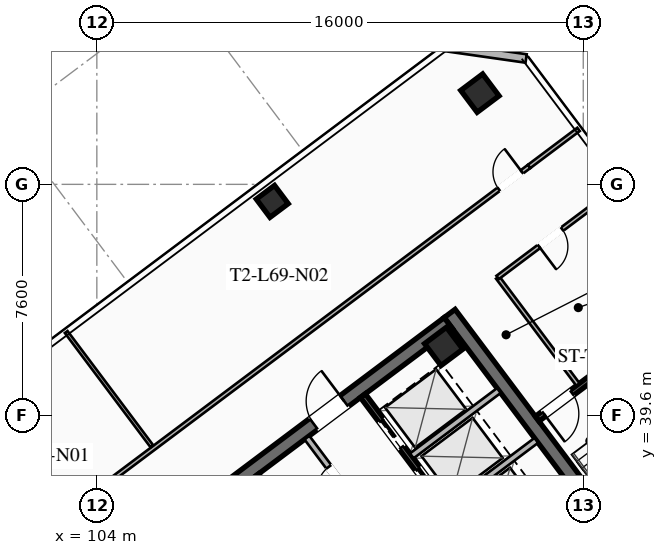
"""IFC4 building model, lengths in metres.
Left out: names, types, materials, properties, quantities, classifications, styles, units other than length and angle.
Written with IfcOpenShell. Run it as: python <this file> out.ifc"""

import sys

from ifc_helpers import new_model, si_unit, direction, frame, frame_2d, origin, origin_2d, place, context, subcontext, project, spatial, rectangle, hollow_rectangle, extrude, element, fill, save


model = new_model("IFC4")
c1 = context("Model", 3, precision=1e-05, world=origin(), true_north=direction((0.0, 1.0)))
c2 = subcontext(c1, "Body", "Model", "MODEL_VIEW")
j1 = project(units=[si_unit("LENGTHUNIT", "METRE"), si_unit("PLANEANGLEUNIT", "RADIAN")], contexts=[c1])
p1 = place(None, origin())
s1 = spatial("IfcSite", under=j1, at=p1, CompositionType="ELEMENT")
p2 = place(p1, origin())
s2 = spatial("IfcBuilding", under=s1, at=p2, CompositionType="ELEMENT")
p3 = place(p2, frame((0.0, 0.0, 255.4)))
s3 = spatial("IfcBuildingStorey", under=s2, at=p3, CompositionType="ELEMENT", Elevation=255.4)
p4 = place(p3, frame((115.604, 42.953, 0.0), z_axis=(0.0, 0.0, 1.0), x_axis=(0.600005007985, -0.799996243986, 0.0)))
e1 = element("IfcWall", 1, at=p4, inside=s3, PredefinedType="SHEAR", context=c2, shape_type="SweptSolid", body=[
    extrude(rectangle(XDim=15.6, YDim=0.45, at=frame_2d((7.8, 0.0))), origin(), (0.0, 0.0, 1.0), 4.0),
])
p5 = place(p3, frame((103.351, 33.482, 0.0), z_axis=(0.0, 0.0, 1.0), x_axis=(0.8, 0.6, 0.0)))
e2 = element("IfcWall", 2, at=p5, inside=s3, PredefinedType="SHEAR", context=c2, shape_type="SweptSolid", body=[
    extrude(rectangle(XDim=15.26, YDim=0.45, at=frame_2d((7.63, 0.0))), origin(), (0.0, 0.0, 1.0), 4.0),
])
p6 = place(p5, frame((4.68, 0.0, 0.0)))
e3 = element("IfcOpeningElement", 3, at=p6, cuts=e2, PredefinedType="OPENING", context=c2, shape_type="SweptSolid", body=[
    extrude(rectangle(XDim=1.25, YDim=2.25, at=frame_2d((0.625, 1.125))), frame((0.0, 0.235, 0.0), z_axis=(0.0, -1.0, 0.0), x_axis=(1.0, 0.0, 0.0)), (0.0, 0.0, 1.0), 0.47),
])
p7 = place(p5, frame((9.73, 0.0, 0.0)))
e4 = element("IfcOpeningElement", 4, at=p7, cuts=e2, PredefinedType="OPENING", context=c2, shape_type="SweptSolid", body=[
    extrude(rectangle(XDim=1.25, YDim=2.25, at=frame_2d((0.625, 1.125))), frame((0.0, 0.235, 0.0), z_axis=(0.0, -1.0, 0.0), x_axis=(1.0, 0.0, 0.0)), (0.0, 0.0, 1.0), 0.47),
])
for number, where, z_axis, x_axis in (
    (5, (115.41, 41.87, 0.0), (0.0, 0.0, 1.0), (0.8, 0.6, 0.0)),
    (6, (116.6, 50.2, 0.0), (0.0, 0.0, 1.0), (0.8, 0.6, 0.0)),
):
    element("IfcColumn", number, at=place(p3, frame(where, z_axis=z_axis, x_axis=x_axis)), inside=s3, PredefinedType="COLUMN", context=c2, shape_type="SweptSolid", body=[
        extrude(hollow_rectangle(XDim=0.9, YDim=0.9, WallThickness=0.04, at=origin_2d()), origin(), (0.0, 0.0, 1.0), 3.78),
    ])
p8 = place(p3, frame((109.77, 46.64, 0.0), z_axis=(0.0, 0.0, 1.0), x_axis=(0.799999996291, 0.600000004945, 0.0)))
e7 = element("IfcColumn", 7, at=p8, inside=s3, PredefinedType="COLUMN", context=c2, shape_type="SweptSolid", body=[
    extrude(hollow_rectangle(XDim=0.75, YDim=0.75, WallThickness=0.032, at=origin_2d()), origin(), (0.0, 0.0, 1.0), 3.78),
])
p9 = place(p3, frame((115.46, 51.72, 0.0), z_axis=(0.0, 0.0, 1.0), x_axis=(0.989956760759, -0.141370477216, 0.0)))
e8 = element("IfcWall", 8, at=p9, inside=s3, PredefinedType="SOLIDWALL", context=c2, shape_type="SweptSolid", body=[
    extrude(rectangle(XDim=2.687, YDim=0.28, at=frame_2d((1.344, 0.0))), origin(), (0.0, 0.0, 1.0), 3.78),
])
p10 = place(p3, frame((118.058, 25.856, 0.0), z_axis=(0.0, 0.0, 1.0), x_axis=(-0.600002657301, 0.799998007018, 0.0)))
e9 = element("IfcWall", 9, at=p10, inside=s3, PredefinedType="SHEAR", context=c2, shape_type="SweptSolid", body=[
    extrude(rectangle(XDim=14.7, YDim=0.2, at=frame_2d((7.35, 0.0))), origin(), (0.0, 0.0, 1.0), 3.78),
])
p11 = place(p3, frame((112.75, 40.25, 0.0), z_axis=(0.0, 0.0, 1.0), x_axis=(0.599994036198, -0.800004472816, 0.0)))
e10 = element("IfcWall", 10, at=p11, inside=s3, PredefinedType="SHEAR", context=c2, shape_type="SweptSolid", body=[
    extrude(rectangle(XDim=6.55, YDim=0.2, at=frame_2d((3.275, 0.0))), origin(), (0.0, 0.0, 1.0), 3.78),
])
p12 = place(p11, frame((5.075, 0.0, 0.0)))
e11 = element("IfcOpeningElement", 11, at=p12, cuts=e10, PredefinedType="OPENING", context=c2, shape_type="SweptSolid", body=[
    extrude(rectangle(XDim=1.1, YDim=2.2, at=frame_2d((0.55, 1.1))), frame((0.0, 0.11, 0.0), z_axis=(0.0, -1.0, 0.0), x_axis=(1.0, 0.0, 0.0)), (0.0, 0.0, 1.0), 0.22),
])
p13 = place(p11, frame((3.025, 0.0, 0.0)))
e12 = element("IfcOpeningElement", 12, at=p13, cuts=e10, PredefinedType="OPENING", context=c2, shape_type="SweptSolid", body=[
    extrude(rectangle(XDim=1.1, YDim=2.2, at=frame_2d((0.55, 1.1))), frame((0.0, 0.11, 0.0), z_axis=(0.0, -1.0, 0.0), x_axis=(1.0, 0.0, 0.0)), (0.0, 0.0, 1.0), 0.22),
])
p14 = place(p11, frame((1.025, 0.0, 0.0)))
e13 = element("IfcOpeningElement", 13, at=p14, cuts=e10, PredefinedType="OPENING", context=c2, shape_type="SweptSolid", body=[
    extrude(rectangle(XDim=1.1, YDim=2.2, at=frame_2d((0.55, 1.1))), frame((0.0, 0.11, 0.0), z_axis=(0.0, -1.0, 0.0), x_axis=(1.0, 0.0, 0.0)), (0.0, 0.0, 1.0), 0.22),
])
for number, where, z_axis, x_axis in (
    (14, (115.59, 36.63, 0.0), (0.0, 0.0, 1.0), (0.8, 0.6, 0.0)),
    (15, (114.36, 38.27, 0.0), (0.0, 0.0, 1.0), (0.8, 0.6, 0.0)),
):
    element("IfcWall", number, at=place(p3, frame(where, z_axis=z_axis, x_axis=x_axis)), inside=s3, PredefinedType="SOLIDWALL", context=c2, shape_type="SweptSolid", body=[
        extrude(rectangle(XDim=3.58, YDim=0.2, at=frame_2d((1.79, 0.0))), origin(), (0.0, 0.0, 1.0), 3.78),
    ])
p15 = place(p3, frame((115.11, 33.27, 0.0), z_axis=(0.0, 0.0, 1.0), x_axis=(-0.600011160345, 0.79999162962, 0.0)))
e16 = element("IfcWall", 16, at=p15, inside=s3, PredefinedType="SOLIDWALL", context=c2, shape_type="SweptSolid", body=[
    extrude(rectangle(XDim=7.0, YDim=0.2, at=frame_2d((3.5, 0.0))), origin(), (0.0, 0.0, 1.0), 2.971),
])
p16 = place(p15, frame((0.85, 0.0, 0.0)))
e17 = element("IfcOpeningElement", 17, at=p16, cuts=e16, PredefinedType="OPENING", context=c2, shape_type="SweptSolid", body=[
    extrude(rectangle(XDim=0.95, YDim=2.05, at=frame_2d((0.475, 1.025))), frame((0.0, 0.11, 0.0), z_axis=(0.0, -1.0, 0.0), x_axis=(1.0, 0.0, 0.0)), (0.0, 0.0, 1.0), 0.22),
])
p17 = place(p15, frame((4.85, 0.0, 0.0)))
e18 = element("IfcOpeningElement", 18, at=p17, cuts=e16, PredefinedType="OPENING", context=c2, shape_type="SweptSolid", body=[
    extrude(rectangle(XDim=0.95, YDim=2.05, at=frame_2d((0.475, 1.025))), frame((0.0, 0.11, 0.0), z_axis=(0.0, -1.0, 0.0), x_axis=(1.0, 0.0, 0.0)), (0.0, 0.0, 1.0), 0.22),
])
p18 = place(p3, frame((121.204, 41.528, 0.0), z_axis=(0.0, 0.0, 1.0), x_axis=(-0.800017232136, -0.599977023131, 0.0)))
e19 = element("IfcWall", 19, at=p18, inside=s3, PredefinedType="SHEAR", context=c2, shape_type="SweptSolid", body=[
    extrude(rectangle(XDim=3.4, YDim=0.2, at=frame_2d((1.7, 0.0))), origin(), (0.0, 0.0, 1.0), 3.78),
])
p19 = place(p18, frame((1.975, 0.0, 0.0)))
e20 = element("IfcOpeningElement", 20, at=p19, cuts=e19, PredefinedType="OPENING", context=c2, shape_type="SweptSolid", body=[
    extrude(rectangle(XDim=1.15, YDim=2.2, at=frame_2d((0.575, 1.1))), frame((0.0, 0.11, 0.0), z_axis=(0.0, -1.0, 0.0), x_axis=(1.0, 0.0, 0.0)), (0.0, 0.0, 1.0), 0.22),
])
p20 = place(p3, frame((119.824, 40.618, 0.0), z_axis=(0.0, 0.0, 1.0), x_axis=(-0.599982243973, 0.800013316712, 0.0)))
e21 = element("IfcWall", 21, at=p20, inside=s3, PredefinedType="PARTITIONING", context=c2, shape_type="SweptSolid", body=[
    extrude(rectangle(XDim=4.4, YDim=0.135, at=frame_2d((2.2, 0.0))), origin(), (0.0, 0.0, 1.0), 2.971),
])
p21 = place(p3, frame((100.236, 34.302, 0.0), z_axis=(0.0, 0.0, 1.0), x_axis=(0.799997393501, 0.600003475316, 0.0)))
e22 = element("IfcWall", 22, at=p21, inside=s3, PredefinedType="PARTITIONING", context=c2, shape_type="SweptSolid", body=[
    extrude(rectangle(XDim=22.48, YDim=0.135, at=frame_2d((11.24, 0.0))), origin(), (0.0, 0.0, 1.0), 2.971),
])
p22 = place(p21, frame((0.3, 0.0, 0.0)))
e23 = element("IfcOpeningElement", 23, at=p22, cuts=e22, PredefinedType="OPENING", context=c2, shape_type="SweptSolid", body=[
    extrude(rectangle(XDim=0.95, YDim=2.05, at=frame_2d((0.475, 1.025))), frame((0.0, 0.077, 0.0), z_axis=(0.0, -1.0, 0.0), x_axis=(1.0, 0.0, 0.0)), (0.0, 0.0, 1.0), 0.155),
])
p23 = place(p21, frame((21.23, 0.0, 0.0)))
e24 = element("IfcOpeningElement", 24, at=p23, cuts=e22, PredefinedType="OPENING", context=c2, shape_type="SweptSolid", body=[
    extrude(rectangle(XDim=0.95, YDim=2.05, at=frame_2d((0.475, 1.025))), frame((0.0, 0.077, 0.0), z_axis=(0.0, -1.0, 0.0), x_axis=(1.0, 0.0, 0.0)), (0.0, 0.0, 1.0), 0.155),
])
p24 = place(p3, frame((118.22, 47.79, 0.0), z_axis=(0.0, 0.0, 1.0), x_axis=(0.8, 0.6, 0.0)))
e25 = element("IfcWall", 25, at=p24, inside=s3, PredefinedType="PARTITIONING", context=c2, shape_type="SweptSolid", body=[
    extrude(rectangle(XDim=2.03, YDim=0.135, at=frame_2d((1.015, 0.0))), origin(), (0.0, 0.0, 1.0), 2.971),
])
p25 = place(p3, frame((105.812, 38.584, 0.0), z_axis=(0.0, 0.0, 1.0), x_axis=(-0.600008311051, 0.799993766644, 0.0)))
e26 = element("IfcWall", 26, at=p25, inside=s3, PredefinedType="PARTITIONING", context=c2, shape_type="SweptSolid", body=[
    extrude(rectangle(XDim=4.7, YDim=0.11, at=frame_2d((2.35, 0.0))), origin(), (0.0, 0.0, 1.0), 2.971),
])
p26 = place(p3, frame((121.224, 47.168, 0.0), z_axis=(0.0, 0.0, 1.0), x_axis=(-0.8, -0.6, 0.0)))
e27 = element("IfcWall", 27, at=p26, inside=s3, PredefinedType="PARTITIONING", context=c2, shape_type="SweptSolid", body=[
    extrude(rectangle(XDim=5.05, YDim=0.135, at=frame_2d((2.525, 0.0))), origin(), (0.0, 0.0, 1.0), 2.971),
])
p27 = place(p26, frame((2.4, 0.0, 0.0)))
e28 = element("IfcOpeningElement", 28, at=p27, cuts=e27, PredefinedType="OPENING", context=c2, shape_type="SweptSolid", body=[
    extrude(rectangle(XDim=0.95, YDim=2.05, at=frame_2d((0.475, 1.025))), frame((0.0, 0.077, 0.0), z_axis=(0.0, -1.0, 0.0), x_axis=(1.0, 0.0, 0.0)), (0.0, 0.0, 1.0), 0.155),
])
p28 = place(p7, origin())
e29 = element("IfcDoor", 29, at=p28, inside=s3, OperationType="SINGLE_SWING_RIGHT", PredefinedType="DOOR", context=c2, shape_type="SweptSolid", body=[
    extrude(rectangle(XDim=1.25, YDim=2.25, at=frame_2d((0.625, 1.125))), frame((0.0, 0.025, 0.0), z_axis=(0.0, -1.0, 0.0), x_axis=(1.0, 0.0, 0.0)), (0.0, 0.0, 1.0), 0.05),
])
fill(e4, e29)
p29 = place(p17, origin())
e30 = element("IfcDoor", 30, at=p29, inside=s3, OperationType="SINGLE_SWING_LEFT", PredefinedType="DOOR", context=c2, shape_type="SweptSolid", body=[
    extrude(rectangle(XDim=0.95, YDim=2.05, at=frame_2d((0.475, 1.025))), frame((0.0, 0.025, 0.0), z_axis=(0.0, -1.0, 0.0), x_axis=(1.0, 0.0, 0.0)), (0.0, 0.0, 1.0), 0.05),
])
fill(e18, e30)
p30 = place(p19, origin())
e31 = element("IfcDoor", 31, at=p30, inside=s3, OperationType="SINGLE_SWING_RIGHT", PredefinedType="DOOR", context=c2, shape_type="SweptSolid", body=[
    extrude(rectangle(XDim=1.15, YDim=2.2, at=frame_2d((0.575, 1.1))), frame((0.0, 0.025, 0.0), z_axis=(0.0, -1.0, 0.0), x_axis=(1.0, 0.0, 0.0)), (0.0, 0.0, 1.0), 0.05),
])
fill(e20, e31)
p31 = place(p23, origin())
e32 = element("IfcDoor", 32, at=p31, inside=s3, OperationType="SINGLE_SWING_RIGHT", PredefinedType="DOOR", context=c2, shape_type="SweptSolid", body=[
    extrude(rectangle(XDim=0.95, YDim=2.05, at=frame_2d((0.475, 1.025))), frame((0.0, 0.025, 0.0), z_axis=(0.0, -1.0, 0.0), x_axis=(1.0, 0.0, 0.0)), (0.0, 0.0, 1.0), 0.05),
])
fill(e24, e32)
p32 = place(p27, origin())
e33 = element("IfcDoor", 33, at=p32, inside=s3, OperationType="SINGLE_SWING_RIGHT", PredefinedType="DOOR", context=c2, shape_type="SweptSolid", body=[
    extrude(rectangle(XDim=0.95, YDim=2.05, at=frame_2d((0.475, 1.025))), frame((0.0, 0.025, 0.0), z_axis=(0.0, -1.0, 0.0), x_axis=(1.0, 0.0, 0.0)), (0.0, 0.0, 1.0), 0.05),
])
fill(e28, e33)
p33 = place(p13, origin())
e34 = element("IfcDoor", 34, at=p33, inside=s3, OperationType="SLIDING_TO_LEFT", PredefinedType="DOOR", context=c2, shape_type="SweptSolid", body=[
    extrude(rectangle(XDim=1.1, YDim=2.2, at=frame_2d((0.55, 1.1))), frame((0.0, 0.025, 0.0), z_axis=(0.0, -1.0, 0.0), x_axis=(1.0, 0.0, 0.0)), (0.0, 0.0, 1.0), 0.05),
])
fill(e12, e34)
p34 = place(p14, origin())
e35 = element("IfcDoor", 35, at=p34, inside=s3, OperationType="SLIDING_TO_LEFT", PredefinedType="DOOR", context=c2, shape_type="SweptSolid", body=[
    extrude(rectangle(XDim=1.1, YDim=2.2, at=frame_2d((0.55, 1.1))), frame((0.0, 0.025, 0.0), z_axis=(0.0, -1.0, 0.0), x_axis=(1.0, 0.0, 0.0)), (0.0, 0.0, 1.0), 0.05),
])
fill(e13, e35)
save(model, sys.argv[1])
